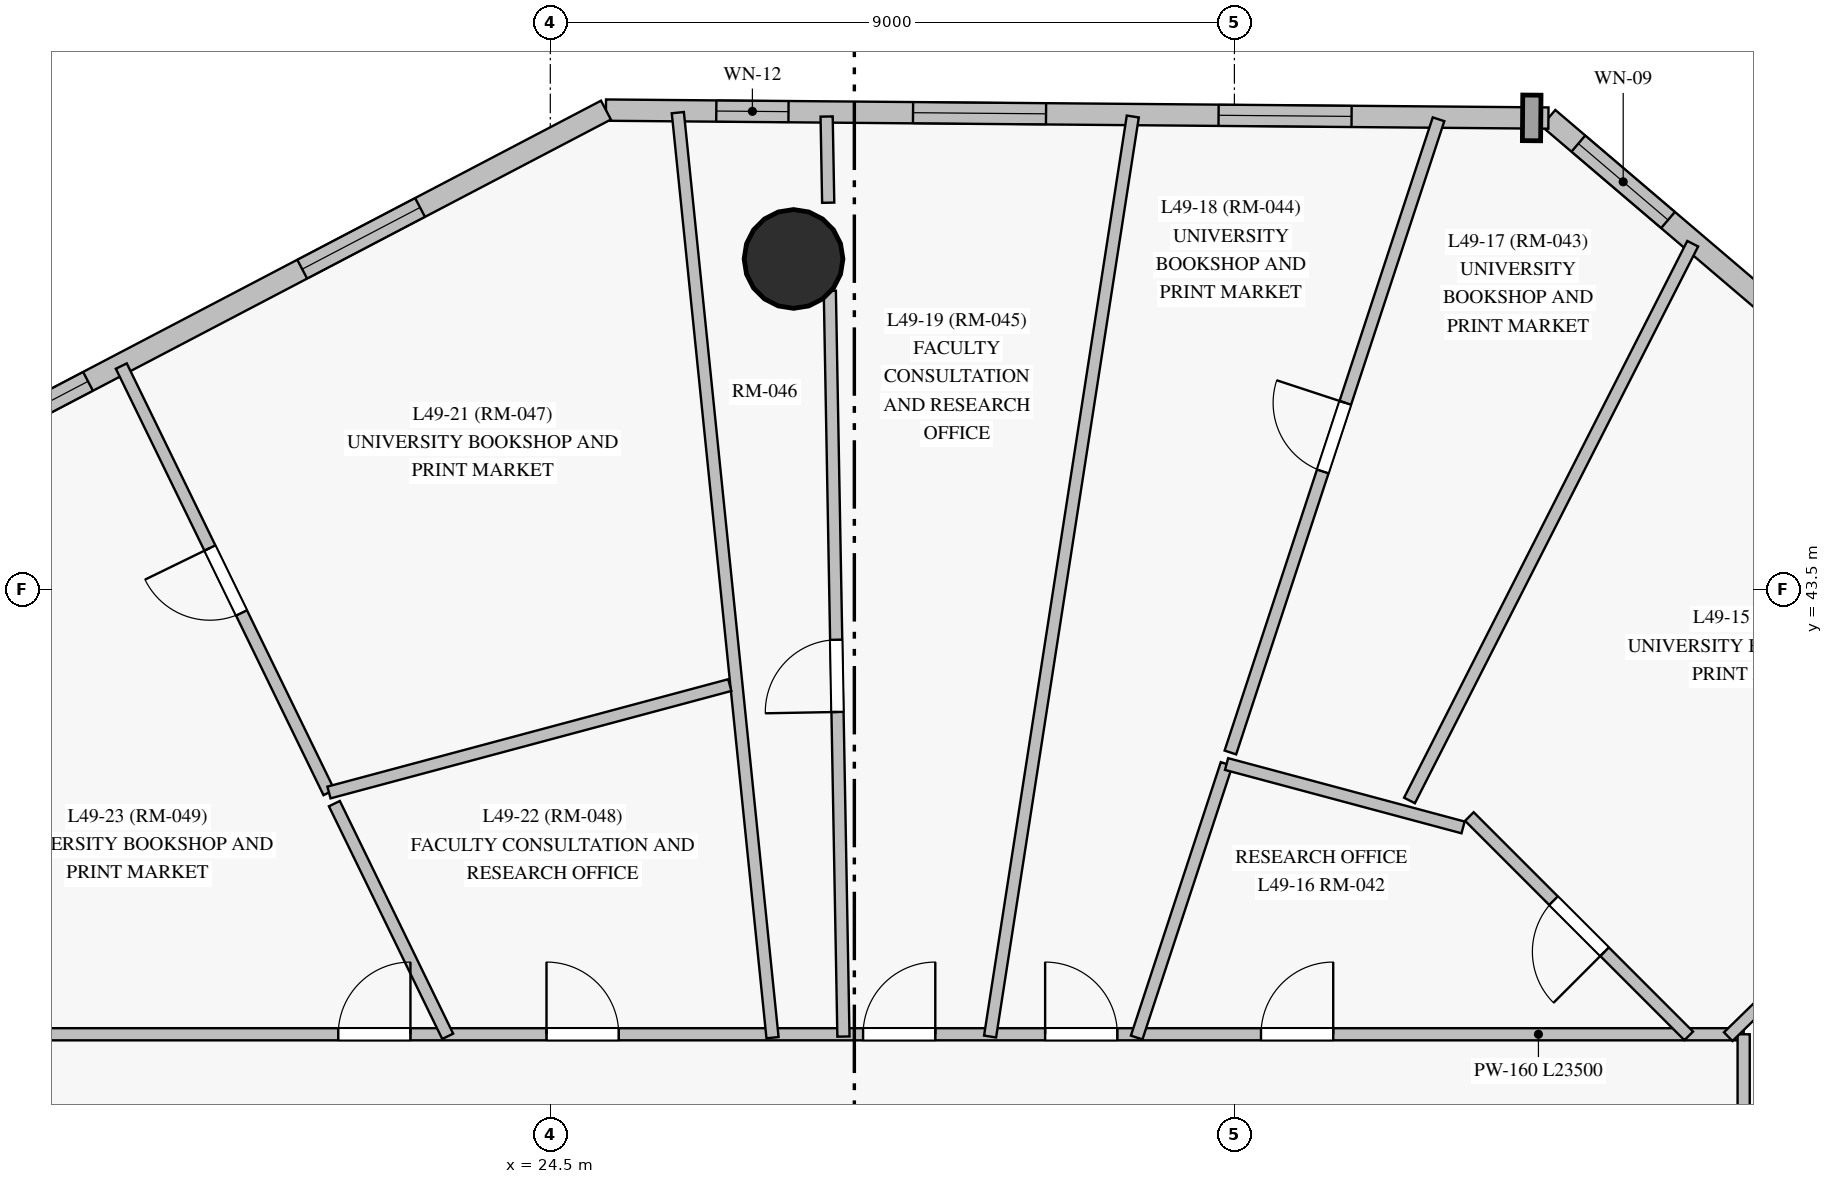
"""IFC4 building model, lengths in metres.
Left out: names, types, materials, properties, quantities, classifications, styles, units other than length and angle.
Written with IfcOpenShell. Run it as: python <this file> out.ifc"""

import sys

from ifc_helpers import new_model, si_unit, direction, frame, frame_2d, origin, origin_with_axes, origin_2d, place, context, subcontext, project, spatial, rectangle, circle, extrude, source, transform, mapped, element, fill, save


model = new_model("IFC4")
c1 = context("Model", 3, precision=1e-05, world=origin(), true_north=direction((0.0, 1.0)))
c2 = subcontext(c1, "Body", "Model", "MODEL_VIEW")
j1 = project(units=[si_unit("LENGTHUNIT", "METRE"), si_unit("PLANEANGLEUNIT", "RADIAN")], contexts=[c1])
p1 = place(None, origin())
s1 = spatial("IfcSite", under=j1, at=p1, CompositionType="ELEMENT")
p2 = place(p1, origin())
s2 = spatial("IfcBuilding", under=s1, at=p2, CompositionType="ELEMENT")
p3 = place(p2, frame((0.0, 0.0, 171.8)))
s3 = spatial("IfcBuildingStorey", under=s2, at=p3, CompositionType="ELEMENT", Elevation=171.8)
m1 = source(origin_with_axes(), c2, "Body", "SweptSolid", [
    extrude(circle(Radius=0.65, at=origin_2d()), origin(), (0.0, 0.0, 1.0), 3.05),
])
p4 = place(p3, frame((27.7, 47.85, 0.0), z_axis=(0.0, 0.0, 1.0), x_axis=(1.0, 0.0, 0.0)))
e1 = element("IfcColumn", 1, at=p4, inside=s3, PredefinedType="COLUMN", context=c2, shape_type="MappedRepresentation", body=[
    mapped(m1, transform((0.0, 0.0, 0.0), scale=1.0)),
])
p5 = place(p3, frame((45.06, 43.372, 0.0), z_axis=(0.0, 0.0, 1.0), x_axis=(-0.761082698503, 0.64865485895, 0.0)))
e2 = element("IfcWall", 2, at=p5, inside=s3, PredefinedType="SOLIDWALL", context=c2, shape_type="SweptSolid", body=[
    extrude(rectangle(XDim=9.761, YDim=0.28, at=frame_2d((4.88, 0.0))), origin(), (0.0, 0.0, 1.0), 2.825),
])
p6 = place(p5, frame((2.773, 0.0, 0.85)))
e3 = element("IfcOpeningElement", 3, at=p6, cuts=e2, PredefinedType="OPENING", context=c2, shape_type="SweptSolid", body=[
    extrude(rectangle(XDim=1.75, YDim=1.65, at=frame_2d((0.875, 0.825))), frame((0.0, 0.15, 0.0), z_axis=(0.0, -1.0, 0.0), x_axis=(1.0, 0.0, 0.0)), (0.0, 0.0, 1.0), 0.3),
])
p7 = place(p5, frame((7.693, 0.0, 0.85)))
e4 = element("IfcOpeningElement", 4, at=p7, cuts=e2, PredefinedType="OPENING", context=c2, shape_type="SweptSolid", body=[
    extrude(rectangle(XDim=1.55, YDim=1.65, at=frame_2d((0.775, 0.825))), frame((0.0, 0.15, 0.0), z_axis=(0.0, -1.0, 0.0), x_axis=(1.0, 0.0, 0.0)), (0.0, 0.0, 1.0), 0.3),
])
p8 = place(p3, frame((37.631, 49.704, 0.0), z_axis=(0.0, 0.0, 1.0), x_axis=(-0.999964493146, 0.008426888302, 0.0)))
e5 = element("IfcWall", 5, at=p8, inside=s3, PredefinedType="SOLIDWALL", context=c2, shape_type="SweptSolid", body=[
    extrude(rectangle(XDim=12.4, YDim=0.28, at=frame_2d((6.2, 0.0))), origin(), (0.0, 0.0, 1.0), 2.825),
])
p9 = place(p8, frame((2.59, 0.0, 0.85)))
e6 = element("IfcOpeningElement", 6, at=p9, cuts=e5, PredefinedType="OPENING", context=c2, shape_type="SweptSolid", body=[
    extrude(rectangle(XDim=1.75, YDim=1.65, at=frame_2d((0.875, 0.825))), frame((0.0, 0.15, 0.0), z_axis=(0.0, -1.0, 0.0), x_axis=(1.0, 0.0, 0.0)), (0.0, 0.0, 1.0), 0.3),
])
p10 = place(p8, frame((6.61, 0.0, 0.85)))
e7 = element("IfcOpeningElement", 7, at=p10, cuts=e5, PredefinedType="OPENING", context=c2, shape_type="SweptSolid", body=[
    extrude(rectangle(XDim=1.75, YDim=1.65, at=frame_2d((0.875, 0.825))), frame((0.0, 0.15, 0.0), z_axis=(0.0, -1.0, 0.0), x_axis=(1.0, 0.0, 0.0)), (0.0, 0.0, 1.0), 0.3),
])
p11 = place(p8, frame((9.998, 0.0, 0.85)))
e8 = element("IfcOpeningElement", 8, at=p11, cuts=e5, PredefinedType="OPENING", context=c2, shape_type="SweptSolid", body=[
    extrude(rectangle(XDim=0.95, YDim=1.5, at=frame_2d((0.475, 0.75))), frame((0.0, 0.15, 0.0), z_axis=(0.0, -1.0, 0.0), x_axis=(1.0, 0.0, 0.0)), (0.0, 0.0, 1.0), 0.3),
])
p12 = place(p3, frame((25.232, 49.808, 0.0), z_axis=(0.0, 0.0, 1.0), x_axis=(-0.88587354348, -0.463926788364, 0.0)))
e9 = element("IfcWall", 9, at=p12, inside=s3, PredefinedType="SOLIDWALL", context=c2, shape_type="SweptSolid", body=[
    extrude(rectangle(XDim=9.782, YDim=0.28, at=frame_2d((4.891, 0.0))), origin(), (0.0, 0.0, 1.0), 2.825),
])
p13 = place(p12, frame((2.761, 0.0, 0.85)))
e10 = element("IfcOpeningElement", 10, at=p13, cuts=e9, PredefinedType="OPENING", context=c2, shape_type="SweptSolid", body=[
    extrude(rectangle(XDim=1.75, YDim=1.65, at=frame_2d((0.875, 0.825))), frame((0.0, 0.15, 0.0), z_axis=(0.0, -1.0, 0.0), x_axis=(1.0, 0.0, 0.0)), (0.0, 0.0, 1.0), 0.3),
])
p14 = place(p12, frame((7.692, 0.0, 0.85)))
e11 = element("IfcOpeningElement", 11, at=p14, cuts=e9, PredefinedType="OPENING", context=c2, shape_type="SweptSolid", body=[
    extrude(rectangle(XDim=1.55, YDim=1.65, at=frame_2d((0.775, 0.825))), frame((0.0, 0.15, 0.0), z_axis=(0.0, -1.0, 0.0), x_axis=(1.0, 0.0, 0.0)), (0.0, 0.0, 1.0), 0.3),
])
p15 = place(p3, frame((16.7, 37.65, 0.0), z_axis=(0.0, 0.0, 1.0), x_axis=(1.0, 0.0, 0.0)))
e12 = element("IfcWall", 12, at=p15, inside=s3, PredefinedType="PARTITIONING", context=c2, shape_type="SweptSolid", body=[
    extrude(rectangle(XDim=23.5, YDim=0.16, at=frame_2d((11.75, 0.0))), origin(), (0.0, 0.0, 1.0), 2.375),
])
p16 = place(p15, frame((17.15, 0.0, 0.0)))
e13 = element("IfcOpeningElement", 13, at=p16, cuts=e12, PredefinedType="OPENING", context=c2, shape_type="SweptSolid", body=[
    extrude(rectangle(XDim=0.95, YDim=2.15, at=frame_2d((0.475, 1.075))), frame((0.0, 0.09, 0.0), z_axis=(0.0, -1.0, 0.0), x_axis=(1.0, 0.0, 0.0)), (0.0, 0.0, 1.0), 0.18),
])
p17 = place(p15, frame((14.31, 0.0, 0.0)))
e14 = element("IfcOpeningElement", 14, at=p17, cuts=e12, PredefinedType="OPENING", context=c2, shape_type="SweptSolid", body=[
    extrude(rectangle(XDim=0.95, YDim=2.15, at=frame_2d((0.475, 1.075))), frame((0.0, 0.09, 0.0), z_axis=(0.0, -1.0, 0.0), x_axis=(1.0, 0.0, 0.0)), (0.0, 0.0, 1.0), 0.18),
])
p18 = place(p15, frame((11.915, 0.0, 0.0)))
e15 = element("IfcOpeningElement", 15, at=p18, cuts=e12, PredefinedType="OPENING", context=c2, shape_type="SweptSolid", body=[
    extrude(rectangle(XDim=0.95, YDim=2.15, at=frame_2d((0.475, 1.075))), frame((0.0, 0.09, 0.0), z_axis=(0.0, -1.0, 0.0), x_axis=(1.0, 0.0, 0.0)), (0.0, 0.0, 1.0), 0.18),
])
p19 = place(p15, frame((7.75, 0.0, 0.0)))
e16 = element("IfcOpeningElement", 16, at=p19, cuts=e12, PredefinedType="OPENING", context=c2, shape_type="SweptSolid", body=[
    extrude(rectangle(XDim=0.95, YDim=2.15, at=frame_2d((0.475, 1.075))), frame((0.0, 0.09, 0.0), z_axis=(0.0, -1.0, 0.0), x_axis=(1.0, 0.0, 0.0)), (0.0, 0.0, 1.0), 0.18),
])
p20 = place(p15, frame((5.01, 0.0, 0.0)))
e17 = element("IfcOpeningElement", 17, at=p20, cuts=e12, PredefinedType="OPENING", context=c2, shape_type="SweptSolid", body=[
    extrude(rectangle(XDim=0.95, YDim=2.15, at=frame_2d((0.475, 1.075))), frame((0.0, 0.09, 0.0), z_axis=(0.0, -1.0, 0.0), x_axis=(1.0, 0.0, 0.0)), (0.0, 0.0, 1.0), 0.18),
])
p21 = place(p3, frame((40.2, 37.65, 0.0), z_axis=(0.0, 0.0, 1.0), x_axis=(0.0, -1.0, 0.0)))
e18 = element("IfcWall", 18, at=p21, inside=s3, PredefinedType="PARTITIONING", context=c2, shape_type="SweptSolid", body=[
    extrude(rectangle(XDim=22.3, YDim=0.16, at=frame_2d((11.15, 0.0))), origin(), (0.0, 0.0, 1.0), 2.375),
])
p22 = place(p21, frame((14.02, 0.0, 0.0)))
e19 = element("IfcOpeningElement", 19, at=p22, cuts=e18, PredefinedType="OPENING", context=c2, shape_type="SweptSolid", body=[
    extrude(rectangle(XDim=0.95, YDim=2.15, at=frame_2d((0.475, 1.075))), frame((0.0, 0.09, 0.0), z_axis=(0.0, -1.0, 0.0), x_axis=(1.0, 0.0, 0.0)), (0.0, 0.0, 1.0), 0.18),
])
p23 = place(p21, frame((10.675, 0.0, 0.0)))
e20 = element("IfcOpeningElement", 20, at=p23, cuts=e18, PredefinedType="OPENING", context=c2, shape_type="SweptSolid", body=[
    extrude(rectangle(XDim=0.95, YDim=2.15, at=frame_2d((0.475, 1.075))), frame((0.0, 0.09, 0.0), z_axis=(0.0, -1.0, 0.0), x_axis=(1.0, 0.0, 0.0)), (0.0, 0.0, 1.0), 0.18),
])
p24 = place(p21, frame((7.33, 0.0, 0.0)))
e21 = element("IfcOpeningElement", 21, at=p24, cuts=e18, PredefinedType="OPENING", context=c2, shape_type="SweptSolid", body=[
    extrude(rectangle(XDim=0.95, YDim=2.15, at=frame_2d((0.475, 1.075))), frame((0.0, 0.09, 0.0), z_axis=(0.0, -1.0, 0.0), x_axis=(1.0, 0.0, 0.0)), (0.0, 0.0, 1.0), 0.18),
])
p25 = place(p3, frame((30.286, 37.62, 0.0), z_axis=(0.0, 0.0, 1.0), x_axis=(0.153298738151, 0.988179890952, 0.0)))
e22 = element("IfcWall", 22, at=p25, inside=s3, PredefinedType="PARTITIONING", context=c2, shape_type="SweptSolid", body=[
    extrude(rectangle(XDim=12.249, YDim=0.16, at=frame_2d((6.124, 0.0))), origin(), (0.0, 0.0, 1.0), 2.825),
])
p26 = place(p3, frame((27.424, 37.605, 0.0), z_axis=(0.0, 0.0, 1.0), x_axis=(-0.101840991834, 0.994800689778, 0.0)))
e23 = element("IfcWall", 23, at=p26, inside=s3, PredefinedType="PARTITIONING", context=c2, shape_type="SweptSolid", body=[
    extrude(rectangle(XDim=12.233, YDim=0.16, at=frame_2d((6.117, 0.0))), origin(), (0.0, 0.0, 1.0), 2.275),
])
p27 = place(p3, frame((28.357, 37.62, 0.0), z_axis=(0.0, 0.0, 1.0), x_axis=(-0.018288713091, 0.9998327475, 0.0)))
e24 = element("IfcWall", 24, at=p27, inside=s3, PredefinedType="PARTITIONING", context=c2, shape_type="SweptSolid", body=[
    extrude(rectangle(XDim=9.812, YDim=0.16, at=frame_2d((4.906, 0.0))), origin(), (0.0, 0.0, 1.0), 2.275),
])
p28 = place(p27, frame((4.271, 0.0, 0.0)))
e25 = element("IfcOpeningElement", 25, at=p28, cuts=e24, PredefinedType="OPENING", context=c2, shape_type="SweptSolid", body=[
    extrude(rectangle(XDim=0.95, YDim=2.15, at=frame_2d((0.475, 1.075))), frame((0.0, 0.09, 0.0), z_axis=(0.0, -1.0, 0.0), x_axis=(1.0, 0.0, 0.0)), (0.0, 0.0, 1.0), 0.18),
])
p29 = place(p3, frame((33.447, 41.357, 0.0), z_axis=(0.0, 0.0, 1.0), x_axis=(0.312266005105, 0.94999470633, 0.0)))
e26 = element("IfcWall", 26, at=p29, inside=s3, PredefinedType="PARTITIONING", context=c2, shape_type="SweptSolid", body=[
    extrude(rectangle(XDim=8.769, YDim=0.16, at=frame_2d((4.385, 0.0))), origin(), (0.0, 0.0, 1.0), 2.825),
])
p30 = place(p29, frame((3.892, 0.0, 0.0)))
e27 = element("IfcOpeningElement", 27, at=p30, cuts=e26, PredefinedType="OPENING", context=c2, shape_type="SweptSolid", body=[
    extrude(rectangle(XDim=0.95, YDim=2.15, at=frame_2d((0.475, 1.075))), frame((0.0, 0.09, 0.0), z_axis=(0.0, -1.0, 0.0), x_axis=(1.0, 0.0, 0.0)), (0.0, 0.0, 1.0), 0.18),
])
p31 = place(p3, frame((35.804, 40.726, 0.0), z_axis=(0.0, 0.0, 1.0), x_axis=(0.453382302462, 0.891316154804, 0.0)))
e28 = element("IfcWall", 28, at=p31, inside=s3, PredefinedType="PARTITIONING", context=c2, shape_type="SweptSolid", body=[
    extrude(rectangle(XDim=8.218, YDim=0.16, at=frame_2d((4.109, 0.0))), origin(), (0.0, 0.0, 1.0), 2.825),
])
p32 = place(p3, frame((39.997, 37.619, 0.0), z_axis=(0.0, 0.0, 1.0), x_axis=(0.716204142826, 0.69789084089, 0.0)))
e29 = element("IfcWall", 29, at=p32, inside=s3, PredefinedType="PARTITIONING", context=c2, shape_type="SweptSolid", body=[
    extrude(rectangle(XDim=7.132, YDim=0.16, at=frame_2d((3.566, 0.0))), origin(), (0.0, 0.0, 1.0), 2.825),
])
p33 = place(p3, frame((40.161, 33.425, 0.0), z_axis=(0.0, 0.0, 1.0), x_axis=(0.857539265449, 0.514418514649, 0.0)))
e30 = element("IfcWall", 30, at=p33, inside=s3, PredefinedType="PARTITIONING", context=c2, shape_type="SweptSolid", body=[
    extrude(rectangle(XDim=6.508, YDim=0.16, at=frame_2d((3.254, 0.0))), origin(), (0.0, 0.0, 1.0), 2.825),
])
p34 = place(p33, frame((2.754, 0.0, 0.0)))
e31 = element("IfcOpeningElement", 31, at=p34, cuts=e30, PredefinedType="OPENING", context=c2, shape_type="SweptSolid", body=[
    extrude(rectangle(XDim=0.95, YDim=2.15, at=frame_2d((0.475, 1.075))), frame((0.0, 0.09, 0.0), z_axis=(0.0, -1.0, 0.0), x_axis=(1.0, 0.0, 0.0)), (0.0, 0.0, 1.0), 0.18),
])
p35 = place(p3, frame((21.588, 40.831, 0.0), z_axis=(0.0, 0.0, 1.0), x_axis=(-0.437814557063, 0.899065299978, 0.0)))
e32 = element("IfcWall", 32, at=p35, inside=s3, PredefinedType="PARTITIONING", context=c2, shape_type="SweptSolid", body=[
    extrude(rectangle(XDim=6.24, YDim=0.16, at=frame_2d((3.12, 0.0))), origin(), (0.0, 0.0, 1.0), 2.825),
])
p36 = place(p35, frame((2.627, 0.0, 0.0)))
e33 = element("IfcOpeningElement", 33, at=p36, cuts=e32, PredefinedType="OPENING", context=c2, shape_type="SweptSolid", body=[
    extrude(rectangle(XDim=0.95, YDim=2.15, at=frame_2d((0.475, 1.075))), frame((0.0, 0.09, 0.0), z_axis=(0.0, -1.0, 0.0), x_axis=(1.0, 0.0, 0.0)), (0.0, 0.0, 1.0), 0.18),
])
p37 = place(p3, frame((26.861, 42.244, 0.0), z_axis=(0.0, 0.0, 1.0), x_axis=(-0.965933680277, -0.258789731841, 0.0)))
e34 = element("IfcWall", 34, at=p37, inside=s3, PredefinedType="PARTITIONING", context=c2, shape_type="SweptSolid", body=[
    extrude(rectangle(XDim=5.459, YDim=0.16, at=frame_2d((2.73, 0.0))), origin(), (0.0, 0.0, 1.0), 2.375),
])
p38 = place(p3, frame((39.477, 37.629, 0.0), z_axis=(0.0, 0.0, 1.0), x_axis=(-0.707136690743, 0.707076870365, 0.0)))
e35 = element("IfcWall", 35, at=p38, inside=s3, PredefinedType="PARTITIONING", context=c2, shape_type="SweptSolid", body=[
    extrude(rectangle(XDim=4.081, YDim=0.16, at=frame_2d((2.041, 0.0))), origin(), (0.0, 0.0, 1.0), 2.375),
])
p39 = place(p38, frame((1.566, 0.0, 0.0)))
e36 = element("IfcOpeningElement", 36, at=p39, cuts=e35, PredefinedType="OPENING", context=c2, shape_type="SweptSolid", body=[
    extrude(rectangle(XDim=0.95, YDim=2.15, at=frame_2d((0.475, 1.075))), frame((0.0, 0.09, 0.0), z_axis=(0.0, -1.0, 0.0), x_axis=(1.0, 0.0, 0.0)), (0.0, 0.0, 1.0), 0.18),
])
p40 = place(p3, frame((32.214, 37.607, 0.0), z_axis=(0.0, 0.0, 1.0), x_axis=(0.312337810946, 0.949971100536, 0.0)))
e37 = element("IfcWall", 37, at=p40, inside=s3, PredefinedType="PARTITIONING", context=c2, shape_type="SweptSolid", body=[
    extrude(rectangle(XDim=3.787, YDim=0.16, at=frame_2d((1.894, 0.0))), origin(), (0.0, 0.0, 1.0), 2.825),
])
p41 = place(p3, frame((23.15, 37.623, 0.0), z_axis=(0.0, 0.0, 1.0), x_axis=(-0.437810430728, 0.899067309352, 0.0)))
e38 = element("IfcWall", 38, at=p41, inside=s3, PredefinedType="PARTITIONING", context=c2, shape_type="SweptSolid", body=[
    extrude(rectangle(XDim=3.405, YDim=0.16, at=frame_2d((1.703, 0.0))), origin(), (0.0, 0.0, 1.0), 2.825),
])
p42 = place(p3, frame((33.397, 41.205, 0.0), z_axis=(0.0, 0.0, 1.0), x_axis=(0.965920984925, -0.258837112643, 0.0)))
e39 = element("IfcWall", 39, at=p42, inside=s3, PredefinedType="PARTITIONING", context=c2, shape_type="SweptSolid", body=[
    extrude(rectangle(XDim=3.221, YDim=0.16, at=frame_2d((1.611, 0.0))), origin(), (0.0, 0.0, 1.0), 2.495),
])
p43 = place(p3, frame((28.156, 48.59, 0.0), z_axis=(0.0, 0.0, 1.0), x_axis=(-0.018304061956, 0.999832466624, 0.0)))
e40 = element("IfcWall", 40, at=p43, inside=s3, PredefinedType="PARTITIONING", context=c2, shape_type="SweptSolid", body=[
    extrude(rectangle(XDim=1.134, YDim=0.16, at=frame_2d((0.567, 0.0))), origin(), (0.0, 0.0, 1.0), 2.825),
])
m2 = source(origin_with_axes(), c2, "Body", "SweptSolid", [
    extrude(rectangle(XDim=1.55, YDim=1.65, at=frame_2d((0.775, 0.825))), frame((0.0, 0.03, 0.0), z_axis=(0.0, -1.0, 0.0), x_axis=(1.0, 0.0, 0.0)), (0.0, 0.0, 1.0), 0.06),
])
p44 = place(p7, origin())
e41 = element("IfcWindow", 41, at=p44, inside=s3, PartitioningType="SINGLE_PANEL", PredefinedType="WINDOW", context=c2, shape_type="MappedRepresentation", body=[
    mapped(m2, transform((0.0, 0.0, 0.0), scale=1.0)),
])
fill(e4, e41)
m3 = source(origin_with_axes(), c2, "Body", "SweptSolid", [
    extrude(rectangle(XDim=1.75, YDim=1.65, at=frame_2d((0.875, 0.825))), frame((0.0, 0.03, 0.0), z_axis=(0.0, -1.0, 0.0), x_axis=(1.0, 0.0, 0.0)), (0.0, 0.0, 1.0), 0.06),
])
p45 = place(p9, origin())
e42 = element("IfcWindow", 42, at=p45, inside=s3, PartitioningType="SINGLE_PANEL", PredefinedType="WINDOW", context=c2, shape_type="MappedRepresentation", body=[
    mapped(m3, transform((0.0, 0.0, 0.0), scale=1.0)),
])
fill(e6, e42)
p46 = place(p10, origin())
e43 = element("IfcWindow", 43, at=p46, inside=s3, PartitioningType="SINGLE_PANEL", PredefinedType="WINDOW", context=c2, shape_type="MappedRepresentation", body=[
    mapped(m3, transform((0.0, 0.0, 0.0), scale=1.0)),
])
fill(e7, e43)
m4 = source(origin_with_axes(), c2, "Body", "SweptSolid", [
    extrude(rectangle(XDim=0.95, YDim=1.5, at=frame_2d((0.475, 0.75))), frame((0.0, 0.03, 0.0), z_axis=(0.0, -1.0, 0.0), x_axis=(1.0, 0.0, 0.0)), (0.0, 0.0, 1.0), 0.06),
])
p47 = place(p11, origin())
e44 = element("IfcWindow", 44, at=p47, inside=s3, PartitioningType="SINGLE_PANEL", PredefinedType="WINDOW", context=c2, shape_type="MappedRepresentation", body=[
    mapped(m4, transform((0.0, 0.0, 0.0), scale=1.0)),
])
fill(e8, e44)
p48 = place(p13, origin())
e45 = element("IfcWindow", 45, at=p48, inside=s3, PartitioningType="SINGLE_PANEL", PredefinedType="WINDOW", context=c2, shape_type="MappedRepresentation", body=[
    mapped(m3, transform((0.0, 0.0, 0.0), scale=1.0)),
])
fill(e10, e45)
p49 = place(p14, origin())
e46 = element("IfcWindow", 46, at=p49, inside=s3, PartitioningType="SINGLE_PANEL", PredefinedType="WINDOW", context=c2, shape_type="MappedRepresentation", body=[
    mapped(m2, transform((0.0, 0.0, 0.0), scale=1.0)),
])
fill(e11, e46)
m5 = source(origin_with_axes(), c2, "Body", "SweptSolid", [
    extrude(rectangle(XDim=0.95, YDim=2.15, at=frame_2d((0.475, 1.075))), frame((0.0, 0.025, 0.0), z_axis=(0.0, -1.0, 0.0), x_axis=(1.0, 0.0, 0.0)), (0.0, 0.0, 1.0), 0.05),
])
p50 = place(p16, origin())
e47 = element("IfcDoor", 47, at=p50, inside=s3, OperationType="SINGLE_SWING_RIGHT", PredefinedType="DOOR", context=c2, shape_type="MappedRepresentation", body=[
    mapped(m5, transform((0.0, 0.0, 0.0), scale=1.0)),
])
fill(e13, e47)
p51 = place(p17, origin())
e48 = element("IfcDoor", 48, at=p51, inside=s3, OperationType="SINGLE_SWING_LEFT", PredefinedType="DOOR", context=c2, shape_type="MappedRepresentation", body=[
    mapped(m5, transform((0.0, 0.0, 0.0), scale=1.0)),
])
fill(e14, e48)
p52 = place(p18, origin())
e49 = element("IfcDoor", 49, at=p52, inside=s3, OperationType="SINGLE_SWING_RIGHT", PredefinedType="DOOR", context=c2, shape_type="MappedRepresentation", body=[
    mapped(m5, transform((0.0, 0.0, 0.0), scale=1.0)),
])
fill(e15, e49)
p53 = place(p19, origin())
e50 = element("IfcDoor", 50, at=p53, inside=s3, OperationType="SINGLE_SWING_LEFT", PredefinedType="DOOR", context=c2, shape_type="MappedRepresentation", body=[
    mapped(m5, transform((0.0, 0.0, 0.0), scale=1.0)),
])
fill(e16, e50)
p54 = place(p20, origin())
e51 = element("IfcDoor", 51, at=p54, inside=s3, OperationType="SINGLE_SWING_RIGHT", PredefinedType="DOOR", context=c2, shape_type="MappedRepresentation", body=[
    mapped(m5, transform((0.0, 0.0, 0.0), scale=1.0)),
])
fill(e17, e51)
p55 = place(p39, origin())
e52 = element("IfcDoor", 52, at=p55, inside=s3, OperationType="SINGLE_SWING_LEFT", PredefinedType="DOOR", context=c2, shape_type="MappedRepresentation", body=[
    mapped(m5, transform((0.0, 0.0, 0.0), scale=1.0)),
])
fill(e36, e52)
p56 = place(p30, origin())
e53 = element("IfcDoor", 53, at=p56, inside=s3, OperationType="SINGLE_SWING_RIGHT", PredefinedType="DOOR", context=c2, shape_type="MappedRepresentation", body=[
    mapped(m5, transform((0.0, 0.0, 0.0), scale=1.0)),
])
fill(e27, e53)
p57 = place(p28, origin())
e54 = element("IfcDoor", 54, at=p57, inside=s3, OperationType="SINGLE_SWING_LEFT", PredefinedType="DOOR", context=c2, shape_type="MappedRepresentation", body=[
    mapped(m5, transform((0.0, 0.0, 0.0), scale=1.0)),
])
fill(e25, e54)
p58 = place(p36, origin())
e55 = element("IfcDoor", 55, at=p58, inside=s3, OperationType="SINGLE_SWING_RIGHT", PredefinedType="DOOR", context=c2, shape_type="MappedRepresentation", body=[
    mapped(m5, transform((0.0, 0.0, 0.0), scale=1.0)),
])
fill(e33, e55)
save(model, sys.argv[1])
